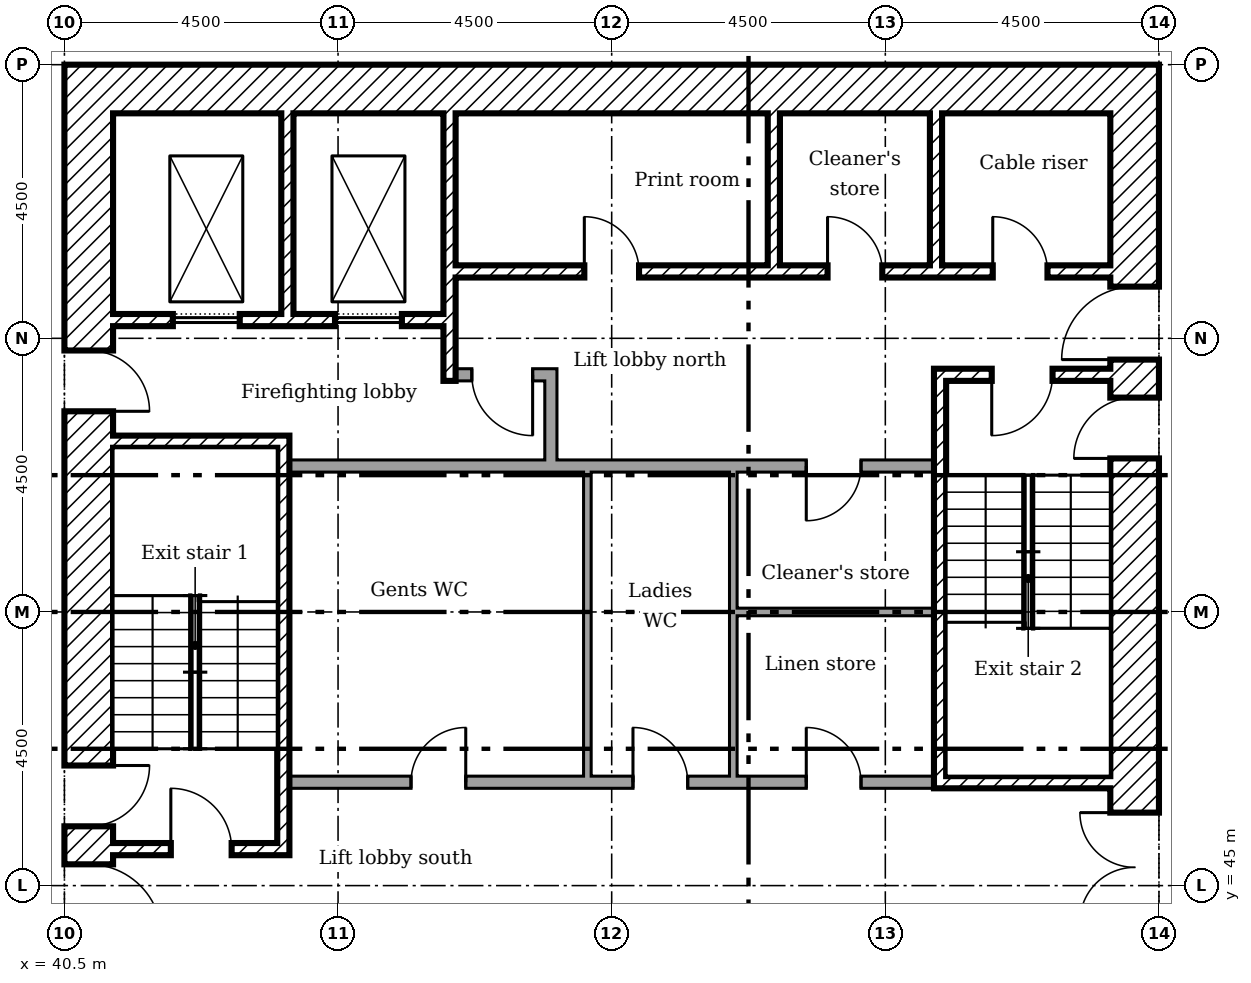
"""IFC4 building model, lengths in metres.
Left out: names, types, materials, properties, quantities, classifications, styles, units other than length and angle.
Written with IfcOpenShell. Run it as: python <this file> out.ifc"""

import sys

from ifc_helpers import new_model, si_unit, direction, frame, frame_2d, origin, place, context, subcontext, project, spatial, rectangle, extrude, element, fill, save


model = new_model("IFC4")
c1 = context("Model", 3, precision=1e-05, world=origin(), true_north=direction((0.0, 1.0)))
c2 = subcontext(c1, "Body", "Model", "MODEL_VIEW")
j1 = project(units=[si_unit("LENGTHUNIT", "METRE"), si_unit("PLANEANGLEUNIT", "RADIAN")], contexts=[c1])
p1 = place(None, origin())
s1 = spatial("IfcSite", under=j1, at=p1, CompositionType="ELEMENT")
p2 = place(p1, origin())
s2 = spatial("IfcBuilding", under=s1, at=p2, CompositionType="ELEMENT")
p3 = place(p2, frame((0.0, 0.0, 65.4)))
s3 = spatial("IfcBuildingStorey", under=s2, at=p3, CompositionType="ELEMENT", Elevation=65.4)
p4 = place(p3, frame((58.1, 40.5, 0.0), z_axis=(0.0, 0.0, 1.0), x_axis=(0.0, 1.0, 0.0)))
e1 = element("IfcWall", 1, at=p4, inside=s3, PredefinedType="SHEAR", context=c2, shape_type="SweptSolid", body=[
    extrude(rectangle(XDim=18.0, YDim=0.8, at=frame_2d((9.0, 0.0))), origin(), (0.0, 0.0, 1.0), 3.35),
])
p5 = place(p4, frame((13.15, 0.0, 0.0)))
e2 = element("IfcOpeningElement", 2, at=p5, cuts=e1, PredefinedType="OPENING", context=c2, shape_type="SweptSolid", body=[
    extrude(rectangle(XDim=1.2, YDim=2.1, at=frame_2d((0.6, 1.05))), frame((0.0, 0.41, 0.0), z_axis=(0.0, -1.0, 0.0), x_axis=(1.0, 0.0, 0.0)), (0.0, 0.0, 1.0), 0.82),
])
p6 = place(p4, frame((3.9, 0.0, 0.0)))
e3 = element("IfcOpeningElement", 3, at=p6, cuts=e1, PredefinedType="OPENING", context=c2, shape_type="SweptSolid", body=[
    extrude(rectangle(XDim=1.8, YDim=2.1, at=frame_2d((0.9, 1.05))), frame((0.0, 0.41, 0.0), z_axis=(0.0, -1.0, 0.0), x_axis=(1.0, 0.0, 0.0)), (0.0, 0.0, 1.0), 0.82),
])
p7 = place(p4, frame((11.525, 0.0, 0.0)))
e4 = element("IfcOpeningElement", 4, at=p7, cuts=e1, PredefinedType="OPENING", context=c2, shape_type="SweptSolid", body=[
    extrude(rectangle(XDim=1.0, YDim=2.1, at=frame_2d((0.5, 1.05))), frame((0.0, 0.41, 0.0), z_axis=(0.0, -1.0, 0.0), x_axis=(1.0, 0.0, 0.0)), (0.0, 0.0, 1.0), 0.82),
])
p8 = place(p3, frame((41.3, 58.1, 0.0)))
e5 = element("IfcWall", 5, at=p8, inside=s3, PredefinedType="SHEAR", context=c2, shape_type="SweptSolid", body=[
    extrude(rectangle(XDim=16.4, YDim=0.8, at=frame_2d((8.2, 0.0))), origin(), (0.0, 0.0, 1.0), 3.35),
])
p9 = place(p3, frame((40.9, 40.5, 0.0), z_axis=(0.0, 0.0, 1.0), x_axis=(0.0, 1.0, 0.0)))
e6 = element("IfcWall", 6, at=p9, inside=s3, PredefinedType="SHEAR", context=c2, shape_type="SweptSolid", body=[
    extrude(rectangle(XDim=18.0, YDim=0.8, at=frame_2d((9.0, 0.0))), origin(), (0.0, 0.0, 1.0), 3.35),
])
p10 = place(p9, frame((3.65, 0.0, 0.0)))
e7 = element("IfcOpeningElement", 7, at=p10, cuts=e6, PredefinedType="OPENING", context=c2, shape_type="SweptSolid", body=[
    extrude(rectangle(XDim=1.2, YDim=2.1, at=frame_2d((0.6, 1.05))), frame((0.0, 0.41, 0.0), z_axis=(0.0, -1.0, 0.0), x_axis=(1.0, 0.0, 0.0)), (0.0, 0.0, 1.0), 0.82),
])
p11 = place(p9, frame((5.475, 0.0, 0.0)))
e8 = element("IfcOpeningElement", 8, at=p11, cuts=e6, PredefinedType="OPENING", context=c2, shape_type="SweptSolid", body=[
    extrude(rectangle(XDim=1.0, YDim=2.1, at=frame_2d((0.5, 1.05))), frame((0.0, 0.41, 0.0), z_axis=(0.0, -1.0, 0.0), x_axis=(1.0, 0.0, 0.0)), (0.0, 0.0, 1.0), 0.82),
])
p12 = place(p9, frame((12.3, 0.0, 0.0)))
e9 = element("IfcOpeningElement", 9, at=p12, cuts=e6, PredefinedType="OPENING", context=c2, shape_type="SweptSolid", body=[
    extrude(rectangle(XDim=1.0, YDim=2.1, at=frame_2d((0.5, 1.05))), frame((0.0, 0.41, 0.0), z_axis=(0.0, -1.0, 0.0), x_axis=(1.0, 0.0, 0.0)), (0.0, 0.0, 1.0), 0.82),
])
p13 = place(p3, frame((44.167, 57.7, 0.0), z_axis=(0.0, 0.0, 1.0), x_axis=(0.0, -1.0, 0.0)))
e10 = element("IfcWall", 10, at=p13, inside=s3, PredefinedType="SHEAR", context=c2, shape_type="SweptSolid", body=[
    extrude(rectangle(XDim=3.3, YDim=0.2, at=frame_2d((1.65, 0.0))), origin(), (0.0, 0.0, 1.0), 3.35),
])
p14 = place(p3, frame((46.833, 57.7, 0.0), z_axis=(0.0, 0.0, 1.0), x_axis=(0.0, -1.0, 0.0)))
e11 = element("IfcWall", 11, at=p14, inside=s3, PredefinedType="SHEAR", context=c2, shape_type="SweptSolid", body=[
    extrude(rectangle(XDim=4.4, YDim=0.2, at=frame_2d((2.2, 0.0))), origin(), (0.0, 0.0, 1.0), 3.35),
])
for number, where, z_axis, x_axis in (
    (12, (52.167, 57.7, 0.0), (0.0, 0.0, 1.0), (0.0, -1.0, 0.0)),
    (13, (54.833, 57.7, 0.0), (0.0, 0.0, 1.0), (0.0, -1.0, 0.0)),
):
    element("IfcWall", number, at=place(p3, frame(where, z_axis=z_axis, x_axis=x_axis)), inside=s3, PredefinedType="SHEAR", context=c2, shape_type="SweptSolid", body=[
        extrude(rectangle(XDim=2.5, YDim=0.2, at=frame_2d((1.25, 0.0))), origin(), (0.0, 0.0, 1.0), 3.35),
    ])
p15 = place(p3, frame((48.5, 51.9, 0.0), z_axis=(0.0, 0.0, 1.0), x_axis=(0.0, 1.0, 0.0)))
e14 = element("IfcWall", 14, at=p15, inside=s3, PredefinedType="PARTITIONING", context=c2, shape_type="SweptSolid", body=[
    extrude(rectangle(XDim=1.6, YDim=0.2, at=frame_2d((0.8, 0.0))), origin(), (0.0, 0.0, 1.0), 3.35),
])
p16 = place(p3, frame((46.933, 53.4, 0.0)))
e15 = element("IfcWall", 15, at=p16, inside=s3, PredefinedType="PARTITIONING", context=c2, shape_type="SweptSolid", body=[
    extrude(rectangle(XDim=1.467, YDim=0.2, at=frame_2d((0.733, 0.0))), origin(), (0.0, 0.0, 1.0), 3.35),
])
p17 = place(p16, frame((0.267, 0.0, 0.0)))
e16 = element("IfcOpeningElement", 16, at=p17, cuts=e15, PredefinedType="OPENING", context=c2, shape_type="SweptSolid", body=[
    extrude(rectangle(XDim=1.0, YDim=2.1, at=frame_2d((0.5, 1.05))), frame((0.0, 0.11, 0.0), z_axis=(0.0, -1.0, 0.0), x_axis=(1.0, 0.0, 0.0)), (0.0, 0.0, 1.0), 0.22),
])
p18 = place(p3, frame((46.933, 55.1, 0.0)))
e17 = element("IfcWall", 17, at=p18, inside=s3, PredefinedType="SHEAR", context=c2, shape_type="SweptSolid", body=[
    extrude(rectangle(XDim=10.767, YDim=0.2, at=frame_2d((5.383, 0.0))), origin(), (0.0, 0.0, 1.0), 3.35),
])
p19 = place(p18, frame((8.833, 0.0, 0.0)))
e18 = element("IfcOpeningElement", 18, at=p19, cuts=e17, PredefinedType="OPENING", context=c2, shape_type="SweptSolid", body=[
    extrude(rectangle(XDim=0.9, YDim=2.1, at=frame_2d((0.45, 1.05))), frame((0.0, 0.11, 0.0), z_axis=(0.0, -1.0, 0.0), x_axis=(1.0, 0.0, 0.0)), (0.0, 0.0, 1.0), 0.22),
])
p20 = place(p18, frame((2.117, 0.0, 0.0)))
e19 = element("IfcOpeningElement", 19, at=p20, cuts=e17, PredefinedType="OPENING", context=c2, shape_type="SweptSolid", body=[
    extrude(rectangle(XDim=0.9, YDim=2.1, at=frame_2d((0.45, 1.05))), frame((0.0, 0.11, 0.0), z_axis=(0.0, -1.0, 0.0), x_axis=(1.0, 0.0, 0.0)), (0.0, 0.0, 1.0), 0.22),
])
p21 = place(p18, frame((6.117, 0.0, 0.0)))
e20 = element("IfcOpeningElement", 20, at=p21, cuts=e17, PredefinedType="OPENING", context=c2, shape_type="SweptSolid", body=[
    extrude(rectangle(XDim=0.9, YDim=2.1, at=frame_2d((0.45, 1.05))), frame((0.0, 0.11, 0.0), z_axis=(0.0, -1.0, 0.0), x_axis=(1.0, 0.0, 0.0)), (0.0, 0.0, 1.0), 0.22),
])
p22 = place(p3, frame((41.3, 54.3, 0.0)))
e21 = element("IfcWall", 21, at=p22, inside=s3, PredefinedType="SHEAR", context=c2, shape_type="SweptSolid", body=[
    extrude(rectangle(XDim=5.433, YDim=0.2, at=frame_2d((2.717, 0.0))), origin(), (0.0, 0.0, 1.0), 3.35),
])
p23 = place(p22, frame((0.983, 0.0, 0.0)))
e22 = element("IfcOpeningElement", 22, at=p23, cuts=e21, PredefinedType="OPENING", context=c2, shape_type="SweptSolid", body=[
    extrude(rectangle(XDim=1.1, YDim=2.1, at=frame_2d((0.55, 1.05))), frame((0.0, 0.11, 0.0), z_axis=(0.0, -1.0, 0.0), x_axis=(1.0, 0.0, 0.0)), (0.0, 0.0, 1.0), 0.22),
])
p24 = place(p22, frame((3.65, 0.0, 0.0)))
e23 = element("IfcOpeningElement", 23, at=p24, cuts=e21, PredefinedType="OPENING", context=c2, shape_type="SweptSolid", body=[
    extrude(rectangle(XDim=1.1, YDim=2.1, at=frame_2d((0.55, 1.05))), frame((0.0, 0.11, 0.0), z_axis=(0.0, -1.0, 0.0), x_axis=(1.0, 0.0, 0.0)), (0.0, 0.0, 1.0), 0.22),
])
p25 = place(p3, frame((44.1, 45.5, 0.0), z_axis=(0.0, 0.0, 1.0), x_axis=(0.0, 1.0, 0.0)))
e24 = element("IfcWall", 24, at=p25, inside=s3, PredefinedType="SHEAR", context=c2, shape_type="SweptSolid", body=[
    extrude(rectangle(XDim=6.9, YDim=0.2, at=frame_2d((3.45, 0.0))), origin(), (0.0, 0.0, 1.0), 3.35),
])
p26 = place(p3, frame((41.3, 52.3, 0.0)))
e25 = element("IfcWall", 25, at=p26, inside=s3, PredefinedType="SHEAR", context=c2, shape_type="SweptSolid", body=[
    extrude(rectangle(XDim=2.7, YDim=0.2, at=frame_2d((1.35, 0.0))), origin(), (0.0, 0.0, 1.0), 3.35),
])
p27 = place(p3, frame((41.3, 45.6, 0.0)))
e26 = element("IfcWall", 26, at=p27, inside=s3, PredefinedType="SHEAR", context=c2, shape_type="SweptSolid", body=[
    extrude(rectangle(XDim=2.7, YDim=0.2, at=frame_2d((1.35, 0.0))), origin(), (0.0, 0.0, 1.0), 3.35),
])
p28 = place(p27, frame((0.95, 0.0, 0.0)))
e27 = element("IfcOpeningElement", 27, at=p28, cuts=e26, PredefinedType="OPENING", context=c2, shape_type="SweptSolid", body=[
    extrude(rectangle(XDim=1.0, YDim=2.1, at=frame_2d((0.5, 1.05))), frame((0.0, 0.11, 0.0), z_axis=(0.0, -1.0, 0.0), x_axis=(1.0, 0.0, 0.0)), (0.0, 0.0, 1.0), 0.22),
])
p29 = place(p3, frame((54.8, 53.4, 0.0)))
e28 = element("IfcWall", 28, at=p29, inside=s3, PredefinedType="SHEAR", context=c2, shape_type="SweptSolid", body=[
    extrude(rectangle(XDim=2.9, YDim=0.2, at=frame_2d((1.45, 0.0))), origin(), (0.0, 0.0, 1.0), 3.35),
])
p30 = place(p29, frame((0.95, 0.0, 0.0)))
e29 = element("IfcOpeningElement", 29, at=p30, cuts=e28, PredefinedType="OPENING", context=c2, shape_type="SweptSolid", body=[
    extrude(rectangle(XDim=1.0, YDim=2.1, at=frame_2d((0.5, 1.05))), frame((0.0, 0.11, 0.0), z_axis=(0.0, -1.0, 0.0), x_axis=(1.0, 0.0, 0.0)), (0.0, 0.0, 1.0), 0.22),
])
p31 = place(p3, frame((54.8, 46.7, 0.0)))
e30 = element("IfcWall", 30, at=p31, inside=s3, PredefinedType="SHEAR", context=c2, shape_type="SweptSolid", body=[
    extrude(rectangle(XDim=2.9, YDim=0.2, at=frame_2d((1.45, 0.0))), origin(), (0.0, 0.0, 1.0), 3.35),
])
p32 = place(p3, frame((54.9, 46.8, 0.0), z_axis=(0.0, 0.0, 1.0), x_axis=(0.0, 1.0, 0.0)))
e31 = element("IfcWall", 31, at=p32, inside=s3, PredefinedType="SHEAR", context=c2, shape_type="SweptSolid", body=[
    extrude(rectangle(XDim=6.5, YDim=0.2, at=frame_2d((3.25, 0.0))), origin(), (0.0, 0.0, 1.0), 3.35),
])
p33 = place(p3, frame((44.2, 51.9, 0.0)))
e32 = element("IfcWall", 32, at=p33, inside=s3, PredefinedType="PARTITIONING", context=c2, shape_type="SweptSolid", body=[
    extrude(rectangle(XDim=10.6, YDim=0.2, at=frame_2d((5.3, 0.0))), origin(), (0.0, 0.0, 1.0), 3.35),
])
p34 = place(p33, frame((8.5, 0.0, 0.0)))
e33 = element("IfcOpeningElement", 33, at=p34, cuts=e32, PredefinedType="OPENING", context=c2, shape_type="SweptSolid", body=[
    extrude(rectangle(XDim=0.9, YDim=2.1, at=frame_2d((0.45, 1.05))), frame((0.0, 0.11, 0.0), z_axis=(0.0, -1.0, 0.0), x_axis=(1.0, 0.0, 0.0)), (0.0, 0.0, 1.0), 0.22),
])
p35 = place(p3, frame((44.2, 46.7, 0.0)))
e34 = element("IfcWall", 34, at=p35, inside=s3, PredefinedType="PARTITIONING", context=c2, shape_type="SweptSolid", body=[
    extrude(rectangle(XDim=10.6, YDim=0.2, at=frame_2d((5.3, 0.0))), origin(), (0.0, 0.0, 1.0), 3.35),
])
p36 = place(p35, frame((2.0, 0.0, 0.0)))
e35 = element("IfcOpeningElement", 35, at=p36, cuts=e34, PredefinedType="OPENING", context=c2, shape_type="SweptSolid", body=[
    extrude(rectangle(XDim=0.9, YDim=2.1, at=frame_2d((0.45, 1.05))), frame((0.0, 0.11, 0.0), z_axis=(0.0, -1.0, 0.0), x_axis=(1.0, 0.0, 0.0)), (0.0, 0.0, 1.0), 0.22),
])
p37 = place(p35, frame((5.65, 0.0, 0.0)))
e36 = element("IfcOpeningElement", 36, at=p37, cuts=e34, PredefinedType="OPENING", context=c2, shape_type="SweptSolid", body=[
    extrude(rectangle(XDim=0.9, YDim=2.1, at=frame_2d((0.45, 1.05))), frame((0.0, 0.11, 0.0), z_axis=(0.0, -1.0, 0.0), x_axis=(1.0, 0.0, 0.0)), (0.0, 0.0, 1.0), 0.22),
])
p38 = place(p35, frame((8.5, 0.0, 0.0)))
e37 = element("IfcOpeningElement", 37, at=p38, cuts=e34, PredefinedType="OPENING", context=c2, shape_type="SweptSolid", body=[
    extrude(rectangle(XDim=0.9, YDim=2.1, at=frame_2d((0.45, 1.05))), frame((0.0, 0.11, 0.0), z_axis=(0.0, -1.0, 0.0), x_axis=(1.0, 0.0, 0.0)), (0.0, 0.0, 1.0), 0.22),
])
p39 = place(p3, frame((49.1, 46.8, 0.0), z_axis=(0.0, 0.0, 1.0), x_axis=(0.0, 1.0, 0.0)))
e38 = element("IfcWall", 38, at=p39, inside=s3, PredefinedType="PARTITIONING", context=c2, shape_type="SweptSolid", body=[
    extrude(rectangle(XDim=5.0, YDim=0.125, at=frame_2d((2.5, 0.0))), origin(), (0.0, 0.0, 1.0), 3.35),
])
p40 = place(p3, frame((51.5, 46.8, 0.0), z_axis=(0.0, 0.0, 1.0), x_axis=(0.0, 1.0, 0.0)))
e39 = element("IfcWall", 39, at=p40, inside=s3, PredefinedType="PARTITIONING", context=c2, shape_type="SweptSolid", body=[
    extrude(rectangle(XDim=2.762, YDim=0.125, at=frame_2d((1.381, 0.0))), origin(), (0.0, 0.0, 1.0), 3.35),
])
p41 = place(p3, frame((51.562, 49.5, 0.0)))
e40 = element("IfcWall", 40, at=p41, inside=s3, PredefinedType="PARTITIONING", context=c2, shape_type="SweptSolid", body=[
    extrude(rectangle(XDim=3.238, YDim=0.125, at=frame_2d((1.619, 0.0))), origin(), (0.0, 0.0, 1.0), 3.35),
])
p42 = place(p3, frame((51.5, 49.5, 0.0), z_axis=(0.0, 0.0, 1.0), x_axis=(0.0, 1.0, 0.0)))
e41 = element("IfcWall", 41, at=p42, inside=s3, PredefinedType="PARTITIONING", context=c2, shape_type="SweptSolid", body=[
    extrude(rectangle(XDim=2.3, YDim=0.125, at=frame_2d((1.15, 0.0))), origin(), (0.0, 0.0, 1.0), 3.35),
])
p43 = place(p5, origin())
e42 = element("IfcDoor", 42, at=p43, inside=s3, OperationType="SINGLE_SWING_RIGHT", PredefinedType="DOOR", context=c2, shape_type="SweptSolid", body=[
    extrude(rectangle(XDim=1.2, YDim=2.1, at=frame_2d((0.6, 1.05))), frame((0.0, 0.025, 0.0), z_axis=(0.0, -1.0, 0.0), x_axis=(1.0, 0.0, 0.0)), (0.0, 0.0, 1.0), 0.05),
])
fill(e2, e42)
p44 = place(p6, origin())
e43 = element("IfcDoor", 43, at=p44, inside=s3, OperationType="DOUBLE_DOOR_SINGLE_SWING", PredefinedType="DOOR", context=c2, shape_type="SweptSolid", body=[
    extrude(rectangle(XDim=1.8, YDim=2.1, at=frame_2d((0.9, 1.05))), frame((0.0, 0.025, 0.0), z_axis=(0.0, -1.0, 0.0), x_axis=(1.0, 0.0, 0.0)), (0.0, 0.0, 1.0), 0.05),
])
fill(e3, e43)
p45 = place(p10, frame((1.2, 0.0, 0.0), x_axis=(-1.0, 0.0, 0.0)))
e44 = element("IfcDoor", 44, at=p45, inside=s3, OperationType="SINGLE_SWING_LEFT", PredefinedType="DOOR", context=c2, shape_type="SweptSolid", body=[
    extrude(rectangle(XDim=1.2, YDim=2.1, at=frame_2d((0.6, 1.05))), frame((0.0, 0.025, 0.0), z_axis=(0.0, -1.0, 0.0), x_axis=(1.0, 0.0, 0.0)), (0.0, 0.0, 1.0), 0.05),
])
fill(e7, e44)
p46 = place(p28, origin())
e45 = element("IfcDoor", 45, at=p46, inside=s3, OperationType="SINGLE_SWING_RIGHT", PredefinedType="DOOR", context=c2, shape_type="SweptSolid", body=[
    extrude(rectangle(XDim=1.0, YDim=2.1, at=frame_2d((0.5, 1.05))), frame((0.0, 0.025, 0.0), z_axis=(0.0, -1.0, 0.0), x_axis=(1.0, 0.0, 0.0)), (0.0, 0.0, 1.0), 0.05),
])
fill(e27, e45)
p47 = place(p11, frame((1.0, 0.0, 0.0), x_axis=(-1.0, 0.0, 0.0)))
e46 = element("IfcDoor", 46, at=p47, inside=s3, OperationType="SINGLE_SWING_RIGHT", PredefinedType="DOOR", context=c2, shape_type="SweptSolid", body=[
    extrude(rectangle(XDim=1.0, YDim=2.1, at=frame_2d((0.5, 1.05))), frame((0.0, 0.025, 0.0), z_axis=(0.0, -1.0, 0.0), x_axis=(1.0, 0.0, 0.0)), (0.0, 0.0, 1.0), 0.05),
])
fill(e8, e46)
p48 = place(p30, frame((1.0, 0.0, 0.0), x_axis=(-1.0, 0.0, 0.0)))
e47 = element("IfcDoor", 47, at=p48, inside=s3, OperationType="SINGLE_SWING_LEFT", PredefinedType="DOOR", context=c2, shape_type="SweptSolid", body=[
    extrude(rectangle(XDim=1.0, YDim=2.1, at=frame_2d((0.5, 1.05))), frame((0.0, 0.025, 0.0), z_axis=(0.0, -1.0, 0.0), x_axis=(1.0, 0.0, 0.0)), (0.0, 0.0, 1.0), 0.05),
])
fill(e29, e47)
p49 = place(p7, origin())
e48 = element("IfcDoor", 48, at=p49, inside=s3, OperationType="SINGLE_SWING_RIGHT", PredefinedType="DOOR", context=c2, shape_type="SweptSolid", body=[
    extrude(rectangle(XDim=1.0, YDim=2.1, at=frame_2d((0.5, 1.05))), frame((0.0, 0.025, 0.0), z_axis=(0.0, -1.0, 0.0), x_axis=(1.0, 0.0, 0.0)), (0.0, 0.0, 1.0), 0.05),
])
fill(e4, e48)
p50 = place(p17, frame((1.0, 0.0, 0.0), x_axis=(-1.0, 0.0, 0.0)))
e49 = element("IfcDoor", 49, at=p50, inside=s3, OperationType="SINGLE_SWING_RIGHT", PredefinedType="DOOR", context=c2, shape_type="SweptSolid", body=[
    extrude(rectangle(XDim=1.0, YDim=2.1, at=frame_2d((0.5, 1.05))), frame((0.0, 0.025, 0.0), z_axis=(0.0, -1.0, 0.0), x_axis=(1.0, 0.0, 0.0)), (0.0, 0.0, 1.0), 0.05),
])
fill(e16, e49)
p51 = place(p12, frame((1.0, 0.0, 0.0), x_axis=(-1.0, 0.0, 0.0)))
e50 = element("IfcDoor", 50, at=p51, inside=s3, OperationType="SINGLE_SWING_LEFT", PredefinedType="DOOR", context=c2, shape_type="SweptSolid", body=[
    extrude(rectangle(XDim=1.0, YDim=2.1, at=frame_2d((0.5, 1.05))), frame((0.0, 0.025, 0.0), z_axis=(0.0, -1.0, 0.0), x_axis=(1.0, 0.0, 0.0)), (0.0, 0.0, 1.0), 0.05),
])
fill(e9, e50)
p52 = place(p19, origin())
e51 = element("IfcDoor", 51, at=p52, inside=s3, OperationType="SINGLE_SWING_RIGHT", PredefinedType="DOOR", context=c2, shape_type="SweptSolid", body=[
    extrude(rectangle(XDim=0.9, YDim=2.1, at=frame_2d((0.45, 1.05))), frame((0.0, 0.025, 0.0), z_axis=(0.0, -1.0, 0.0), x_axis=(1.0, 0.0, 0.0)), (0.0, 0.0, 1.0), 0.05),
])
fill(e18, e51)
p53 = place(p20, origin())
e52 = element("IfcDoor", 52, at=p53, inside=s3, OperationType="SINGLE_SWING_RIGHT", PredefinedType="DOOR", context=c2, shape_type="SweptSolid", body=[
    extrude(rectangle(XDim=0.9, YDim=2.1, at=frame_2d((0.45, 1.05))), frame((0.0, 0.025, 0.0), z_axis=(0.0, -1.0, 0.0), x_axis=(1.0, 0.0, 0.0)), (0.0, 0.0, 1.0), 0.05),
])
fill(e19, e52)
p54 = place(p21, origin())
e53 = element("IfcDoor", 53, at=p54, inside=s3, OperationType="SINGLE_SWING_RIGHT", PredefinedType="DOOR", context=c2, shape_type="SweptSolid", body=[
    extrude(rectangle(XDim=0.9, YDim=2.1, at=frame_2d((0.45, 1.05))), frame((0.0, 0.025, 0.0), z_axis=(0.0, -1.0, 0.0), x_axis=(1.0, 0.0, 0.0)), (0.0, 0.0, 1.0), 0.05),
])
fill(e20, e53)
p55 = place(p36, origin())
e54 = element("IfcDoor", 54, at=p55, inside=s3, OperationType="SINGLE_SWING_LEFT", PredefinedType="DOOR", context=c2, shape_type="SweptSolid", body=[
    extrude(rectangle(XDim=0.9, YDim=2.1, at=frame_2d((0.45, 1.05))), frame((0.0, 0.025, 0.0), z_axis=(0.0, -1.0, 0.0), x_axis=(1.0, 0.0, 0.0)), (0.0, 0.0, 1.0), 0.05),
])
fill(e35, e54)
p56 = place(p37, origin())
e55 = element("IfcDoor", 55, at=p56, inside=s3, OperationType="SINGLE_SWING_RIGHT", PredefinedType="DOOR", context=c2, shape_type="SweptSolid", body=[
    extrude(rectangle(XDim=0.9, YDim=2.1, at=frame_2d((0.45, 1.05))), frame((0.0, 0.025, 0.0), z_axis=(0.0, -1.0, 0.0), x_axis=(1.0, 0.0, 0.0)), (0.0, 0.0, 1.0), 0.05),
])
fill(e36, e55)
p57 = place(p34, frame((0.9, 0.0, 0.0), x_axis=(-1.0, 0.0, 0.0)))
e56 = element("IfcDoor", 56, at=p57, inside=s3, OperationType="SINGLE_SWING_LEFT", PredefinedType="DOOR", context=c2, shape_type="SweptSolid", body=[
    extrude(rectangle(XDim=0.9, YDim=2.1, at=frame_2d((0.45, 1.05))), frame((0.0, 0.025, 0.0), z_axis=(0.0, -1.0, 0.0), x_axis=(1.0, 0.0, 0.0)), (0.0, 0.0, 1.0), 0.05),
])
fill(e33, e56)
p58 = place(p38, origin())
e57 = element("IfcDoor", 57, at=p58, inside=s3, OperationType="SINGLE_SWING_RIGHT", PredefinedType="DOOR", context=c2, shape_type="SweptSolid", body=[
    extrude(rectangle(XDim=0.9, YDim=2.1, at=frame_2d((0.45, 1.05))), frame((0.0, 0.025, 0.0), z_axis=(0.0, -1.0, 0.0), x_axis=(1.0, 0.0, 0.0)), (0.0, 0.0, 1.0), 0.05),
])
fill(e37, e57)
p59 = place(p23, origin())
e58 = element("IfcDoor", 58, at=p59, inside=s3, OperationType="SLIDING_TO_LEFT", PredefinedType="DOOR", context=c2, shape_type="SweptSolid", body=[
    extrude(rectangle(XDim=1.1, YDim=2.1, at=frame_2d((0.55, 1.05))), frame((0.0, 0.025, 0.0), z_axis=(0.0, -1.0, 0.0), x_axis=(1.0, 0.0, 0.0)), (0.0, 0.0, 1.0), 0.05),
])
fill(e22, e58)
p60 = place(p24, origin())
e59 = element("IfcDoor", 59, at=p60, inside=s3, OperationType="SLIDING_TO_LEFT", PredefinedType="DOOR", context=c2, shape_type="SweptSolid", body=[
    extrude(rectangle(XDim=1.1, YDim=2.1, at=frame_2d((0.55, 1.05))), frame((0.0, 0.025, 0.0), z_axis=(0.0, -1.0, 0.0), x_axis=(1.0, 0.0, 0.0)), (0.0, 0.0, 1.0), 0.05),
])
fill(e23, e59)
save(model, sys.argv[1])
